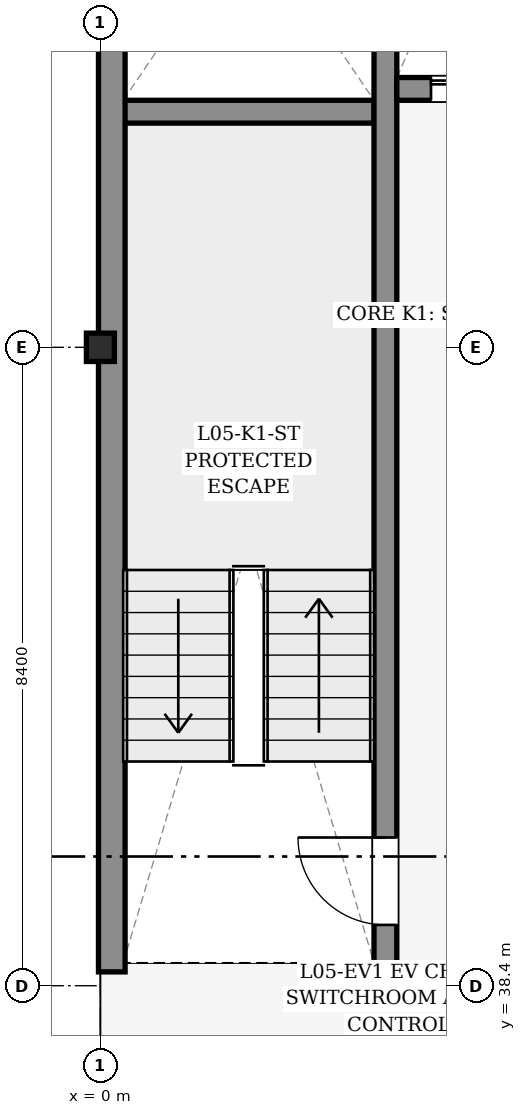
"""IFC4 building model, lengths in metres.
Left out: names, types, materials, properties, quantities, classifications, styles, units other than length and angle.
Written with IfcOpenShell. Run it as: python <this file> out.ifc"""

import sys

from ifc_helpers import new_model, si_unit, direction, frame, frame_2d, origin, origin_2d, place, context, subcontext, project, spatial, rectangle, i_section, extrude, element, fill, save


model = new_model("IFC4")
c1 = context("Model", 3, precision=1e-05, world=origin(), true_north=direction((0.0, 1.0)))
c2 = subcontext(c1, "Body", "Model", "MODEL_VIEW")
j1 = project(units=[si_unit("LENGTHUNIT", "METRE"), si_unit("PLANEANGLEUNIT", "RADIAN")], contexts=[c1])
p1 = place(None, origin())
s1 = spatial("IfcSite", under=j1, at=p1, CompositionType="ELEMENT")
p2 = place(p1, origin())
s2 = spatial("IfcBuilding", under=s1, at=p2, CompositionType="ELEMENT")
p3 = place(p2, frame((0.0, 0.0, 19.8)))
s3 = spatial("IfcBuildingStorey", under=s2, at=p3, CompositionType="ELEMENT", Elevation=19.8)
for number, where, z_axis, x_axis in (
    (1, (0.0, 38.4, 0.0), (0.0, 0.0, 1.0), (1.0, 0.0, 0.0)),
    (2, (0.0, 46.8, 0.0), (0.0, 0.0, 1.0), (1.0, 0.0, 0.0)),
):
    element("IfcColumn", number, at=place(p3, frame(where, z_axis=z_axis, x_axis=x_axis)), inside=s3, PredefinedType="COLUMN", context=c2, shape_type="SweptSolid", body=[
        extrude(i_section(OverallWidth=0.373, OverallDepth=0.368, WebThickness=0.014, FlangeThickness=0.024, FilletRadius=0.015, at=origin_2d()), origin(), (0.0, 0.0, 1.0), 3.6),
    ])
p4 = place(p3, frame((0.185, 38.55, 0.0), z_axis=(0.0, 0.0, 1.0), x_axis=(1.0, 0.0, 0.0)))
e3 = element("IfcWall", 3, at=p4, inside=s3, PredefinedType="SHEAR", context=c2, shape_type="SweptSolid", body=[
    extrude(rectangle(XDim=8.031, YDim=0.3, at=frame_2d((4.016, 0.0))), origin(), (0.0, 0.0, 1.0), 3.38),
])
p5 = place(p3, frame((0.3, 49.9, 0.0), z_axis=(0.0, 0.0, 1.0), x_axis=(1.0, 0.0, 0.0)))
e4 = element("IfcWall", 4, at=p5, inside=s3, PredefinedType="SHEAR", context=c2, shape_type="SweptSolid", body=[
    extrude(rectangle(XDim=3.3, YDim=0.3, at=frame_2d((1.65, 0.0))), origin(), (0.0, 0.0, 1.0), 3.38),
])
p6 = place(p3, frame((0.15, 38.582, 0.0), z_axis=(0.0, 0.0, 1.0), x_axis=(0.0, 1.0, 0.0)))
e5 = element("IfcWall", 5, at=p6, inside=s3, PredefinedType="SHEAR", context=c2, shape_type="SweptSolid", body=[
    extrude(rectangle(XDim=16.436, YDim=0.35, at=frame_2d((8.218, 0.0))), origin(), (0.0, 0.0, 1.0), 3.38),
])
p7 = place(p3, frame((3.75, 38.7, 0.0), z_axis=(0.0, 0.0, 1.0), x_axis=(0.0, 1.0, 0.0)))
e6 = element("IfcWall", 6, at=p7, inside=s3, PredefinedType="SHEAR", context=c2, shape_type="SweptSolid", body=[
    extrude(rectangle(XDim=16.2, YDim=0.3, at=frame_2d((8.1, 0.0))), origin(), (0.0, 0.0, 1.0), 3.38),
])
p8 = place(p7, frame((0.5, 0.0, 0.0)))
e7 = element("IfcOpeningElement", 7, at=p8, cuts=e6, PredefinedType="OPENING", context=c2, shape_type="SweptSolid", body=[
    extrude(rectangle(XDim=1.15, YDim=2.15, at=frame_2d((0.575, 1.075))), frame((0.0, 0.16, 0.0), z_axis=(0.0, -1.0, 0.0), x_axis=(1.0, 0.0, 0.0)), (0.0, 0.0, 1.0), 0.32),
])
p9 = place(p3, frame((3.9, 50.2, 0.0), z_axis=(0.0, 0.0, 1.0), x_axis=(1.0, 0.0, 0.0)))
e8 = element("IfcWall", 8, at=p9, inside=s3, PredefinedType="SHEAR", context=c2, shape_type="SweptSolid", body=[
    extrude(rectangle(XDim=4.2, YDim=0.3, at=frame_2d((2.1, 0.0))), origin(), (0.0, 0.0, 1.0), 3.38),
])
p10 = place(p9, frame((0.45, 0.0, 0.0)))
e9 = element("IfcOpeningElement", 9, at=p10, cuts=e8, PredefinedType="OPENING", context=c2, shape_type="SweptSolid", body=[
    extrude(rectangle(XDim=1.1, YDim=2.2, at=frame_2d((0.55, 1.1))), frame((0.0, 0.16, 0.0), z_axis=(0.0, -1.0, 0.0), x_axis=(1.0, 0.0, 0.0)), (0.0, 0.0, 1.0), 0.32),
])
p11 = place(p9, frame((2.65, 0.0, 0.0)))
e10 = element("IfcOpeningElement", 10, at=p11, cuts=e8, PredefinedType="OPENING", context=c2, shape_type="SweptSolid", body=[
    extrude(rectangle(XDim=1.1, YDim=2.2, at=frame_2d((0.55, 1.1))), frame((0.0, 0.16, 0.0), z_axis=(0.0, -1.0, 0.0), x_axis=(1.0, 0.0, 0.0)), (0.0, 0.0, 1.0), 0.32),
])
p12 = place(p8, frame((1.15, 0.0, 0.0), z_axis=(0.0, 0.0, 1.0), x_axis=(-1.0, 0.0, 0.0)))
e11 = element("IfcDoor", 11, at=p12, inside=s3, OperationType="SINGLE_SWING_LEFT", PredefinedType="DOOR", context=c2, shape_type="SweptSolid", body=[
    extrude(rectangle(XDim=1.15, YDim=2.15, at=frame_2d((0.575, 1.075))), frame((0.0, 0.025, 0.0), z_axis=(0.0, -1.0, 0.0), x_axis=(1.0, 0.0, 0.0)), (0.0, 0.0, 1.0), 0.05),
])
fill(e7, e11)
p13 = place(p10, origin())
e12 = element("IfcDoor", 12, at=p13, inside=s3, OperationType="SLIDING_TO_LEFT", PredefinedType="DOOR", context=c2, shape_type="SweptSolid", body=[
    extrude(rectangle(XDim=1.1, YDim=2.2, at=frame_2d((0.55, 1.1))), frame((0.0, 0.025, 0.0), z_axis=(0.0, -1.0, 0.0), x_axis=(1.0, 0.0, 0.0)), (0.0, 0.0, 1.0), 0.05),
])
fill(e9, e12)
save(model, sys.argv[1])
